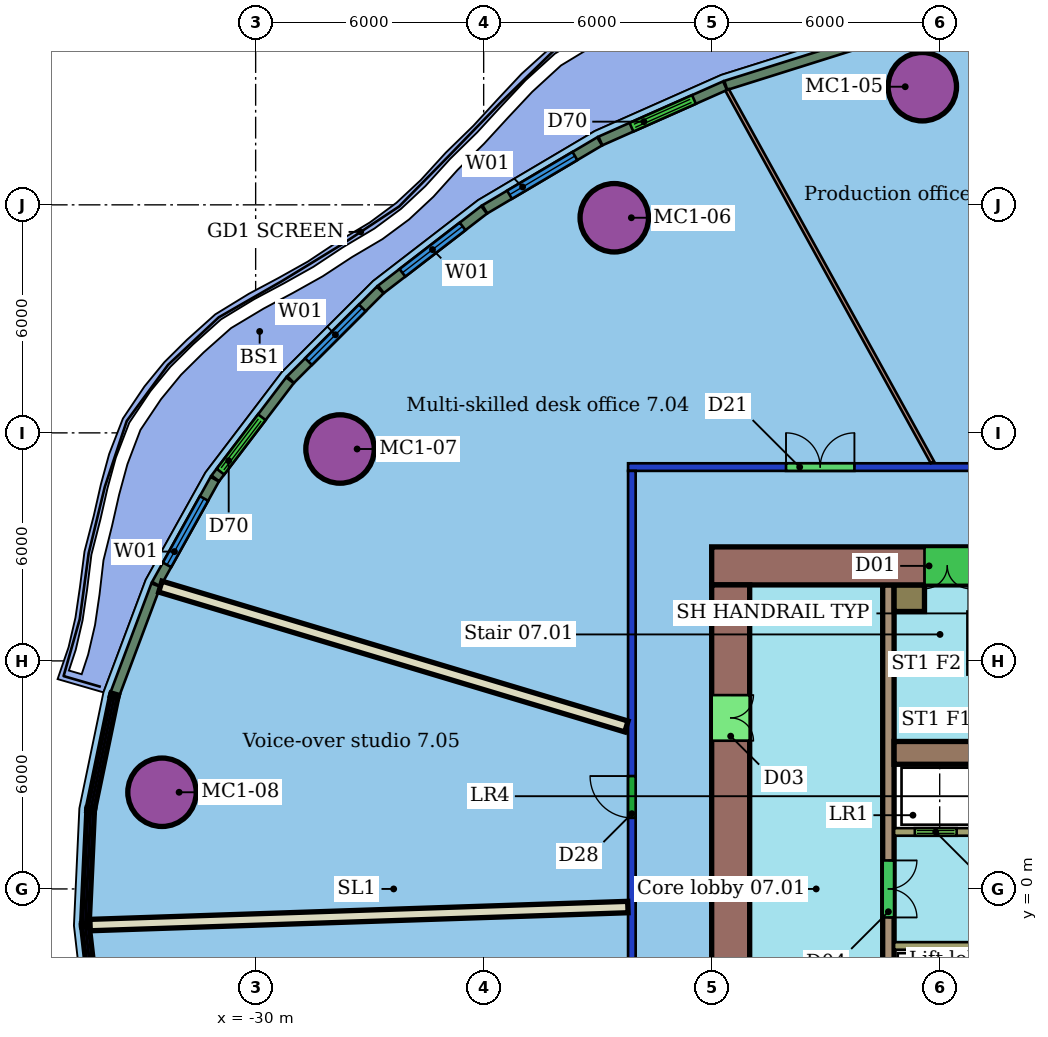
"""IFC4 building model, lengths in metres.
Left out: names, types, materials, properties, quantities, classifications, styles, units other than length and angle.
Written with IfcOpenShell. Run it as: python <this file> out.ifc"""

import sys

from ifc_helpers import new_model, si_unit, direction, frame, frame_2d, origin, origin_2d, place, context, subcontext, project, spatial, rectangle, hollow_circle, extrude, element, fill, save


model = new_model("IFC4")
c1 = context("Model", 3, precision=1e-05, world=origin(), true_north=direction((0.0, 1.0)))
c2 = subcontext(c1, "Body", "Model", "MODEL_VIEW")
j1 = project(units=[si_unit("LENGTHUNIT", "METRE"), si_unit("PLANEANGLEUNIT", "RADIAN")], contexts=[c1])
p1 = place(None, origin())
s1 = spatial("IfcSite", under=j1, at=p1, CompositionType="ELEMENT")
p2 = place(p1, origin())
s2 = spatial("IfcBuilding", under=s1, at=p2, CompositionType="ELEMENT")
p3 = place(p2, frame((0.0, 0.0, 43.4)))
s3 = spatial("IfcBuildingStorey", under=s2, at=p3, CompositionType="ELEMENT", Elevation=43.4)
for number, where, z_axis, x_axis in (
    (1, (-12.458, 21.108, 0.0), (0.0, 0.0, 1.0), (1.0, 0.0, 0.0)),
    (2, (-20.563, 17.66, 0.0), (0.0, 0.0, 1.0), (1.0, 0.0, 0.0)),
    (3, (-27.78, 11.576, 0.0), (0.0, 0.0, 1.0), (1.0, 0.0, 0.0)),
    (4, (-32.464, 2.543, 0.0), (0.0, 0.0, 1.0), (1.0, 0.0, 0.0)),
):
    element("IfcColumn", number, at=place(p3, frame(where, z_axis=z_axis, x_axis=x_axis)), inside=s3, PredefinedType="COLUMN", context=c2, shape_type="SweptSolid", body=[
        extrude(hollow_circle(Radius=0.9, WallThickness=0.06, at=origin_2d()), origin(), (0.0, 0.0, 1.0), 3.55),
    ])
p4 = place(p3, frame((-20.1, -11.0, 0.0), z_axis=(0.0, 0.0, 1.0), x_axis=(0.0, 1.0, 0.0)))
e5 = element("IfcWall", 5, at=p4, inside=s3, PredefinedType="PARTITIONING", context=c2, shape_type="SweptSolid", body=[
    extrude(rectangle(XDim=22.0, YDim=0.2, at=frame_2d((11.0, 0.0))), origin(), (0.0, 0.0, 1.0), 2.85),
])
p5 = place(p4, frame((12.87, 0.0, 0.0)))
e6 = element("IfcOpeningElement", 6, at=p5, cuts=e5, PredefinedType="OPENING", context=c2, shape_type="SweptSolid", body=[
    extrude(rectangle(XDim=1.1, YDim=2.1, at=frame_2d((0.55, 1.05))), frame((0.0, 0.11, 0.0), z_axis=(0.0, -1.0, 0.0), x_axis=(1.0, 0.0, 0.0)), (0.0, 0.0, 1.0), 0.22),
])
p6 = place(p4, frame((5.847, 0.0, 0.0)))
e7 = element("IfcOpeningElement", 7, at=p6, cuts=e5, PredefinedType="OPENING", context=c2, shape_type="SweptSolid", body=[
    extrude(rectangle(XDim=1.8, YDim=2.1, at=frame_2d((0.9, 1.05))), frame((0.0, 0.11, 0.0), z_axis=(0.0, -1.0, 0.0), x_axis=(1.0, 0.0, 0.0)), (0.0, 0.0, 1.0), 0.22),
])
p7 = place(p3, frame((-20.2, 11.1, 0.0), z_axis=(0.0, 0.0, 1.0), x_axis=(1.0, 0.0, 0.0)))
e8 = element("IfcWall", 8, at=p7, inside=s3, PredefinedType="PARTITIONING", context=c2, shape_type="SweptSolid", body=[
    extrude(rectangle(XDim=28.4, YDim=0.2, at=frame_2d((14.2, 0.0))), origin(), (0.0, 0.0, 1.0), 2.85),
])
p8 = place(p7, frame((16.582, 0.0, 0.0)))
e9 = element("IfcOpeningElement", 9, at=p8, cuts=e8, PredefinedType="OPENING", context=c2, shape_type="SweptSolid", body=[
    extrude(rectangle(XDim=1.8, YDim=2.1, at=frame_2d((0.9, 1.05))), frame((0.0, 0.11, 0.0), z_axis=(0.0, -1.0, 0.0), x_axis=(1.0, 0.0, 0.0)), (0.0, 0.0, 1.0), 0.22),
])
p9 = place(p7, frame((9.077, 0.0, 0.0)))
e10 = element("IfcOpeningElement", 10, at=p9, cuts=e8, PredefinedType="OPENING", context=c2, shape_type="SweptSolid", body=[
    extrude(rectangle(XDim=1.0, YDim=2.1, at=frame_2d((0.5, 1.05))), frame((0.0, 0.11, 0.0), z_axis=(0.0, -1.0, 0.0), x_axis=(1.0, 0.0, 0.0)), (0.0, 0.0, 1.0), 0.22),
])
p10 = place(p7, frame((4.156, 0.0, 0.0)))
e11 = element("IfcOpeningElement", 11, at=p10, cuts=e8, PredefinedType="OPENING", context=c2, shape_type="SweptSolid", body=[
    extrude(rectangle(XDim=1.8, YDim=2.1, at=frame_2d((0.9, 1.05))), frame((0.0, 0.11, 0.0), z_axis=(0.0, -1.0, 0.0), x_axis=(1.0, 0.0, 0.0)), (0.0, 0.0, 1.0), 0.22),
])
p11 = place(p3, frame((-17.595, 21.023, 0.0), z_axis=(0.0, 0.0, 1.0), x_axis=(0.482952757362, -0.875646409321, 0.0)))
e12 = element("IfcWall", 12, at=p11, inside=s3, PredefinedType="PARTITIONING", context=c2, shape_type="SweptSolid", body=[
    extrude(rectangle(XDim=11.19, YDim=0.1, at=frame_2d((5.595, 0.0))), origin(), (0.0, 0.0, 1.0), 3.55),
])
p12 = place(p3, frame((-32.508, 7.955, 0.0), z_axis=(0.0, 0.0, 1.0), x_axis=(0.957793744638, -0.287456331872, 0.0)))
e13 = element("IfcWall", 13, at=p12, inside=s3, PredefinedType="PARTITIONING", context=c2, shape_type="SweptSolid", body=[
    extrude(rectangle(XDim=12.805, YDim=0.3, at=frame_2d((6.403, 0.0))), origin(), (0.0, 0.0, 1.0), 3.55),
])
p13 = place(p3, frame((-34.357, -0.951, 0.0), z_axis=(0.0, 0.0, 1.0), x_axis=(0.999438092699, 0.033518634559, 0.0)))
e14 = element("IfcWall", 14, at=p13, inside=s3, PredefinedType="PARTITIONING", context=c2, shape_type="SweptSolid", body=[
    extrude(rectangle(XDim=14.16, YDim=0.3, at=frame_2d((7.08, 0.0))), origin(), (0.0, 0.0, 1.0), 3.55),
])
p14 = place(p3, frame((-14.191, 22.224, 0.0), z_axis=(0.0, 0.0, 1.0), x_axis=(-0.953906738278, -0.300103206694, 0.0)))
e15 = element("IfcWall", 15, at=p14, inside=s3, PredefinedType="SOLIDWALL", context=c2, shape_type="SweptSolid", body=[
    extrude(rectangle(XDim=3.603, YDim=0.25, at=frame_2d((1.802, 0.0))), origin(), (0.0, 0.0, 1.0), 3.15),
])
p15 = place(p3, frame((-17.649, 21.135, 0.0), z_axis=(0.0, 0.0, 1.0), x_axis=(-0.914061167201, -0.405576358552, 0.0)))
e16 = element("IfcWall", 16, at=p15, inside=s3, PredefinedType="SOLIDWALL", context=c2, shape_type="SweptSolid", body=[
    extrude(rectangle(XDim=3.587, YDim=0.25, at=frame_2d((1.793, 0.0))), origin(), (0.0, 0.0, 1.0), 3.15),
])
p16 = place(p15, frame((0.894, 0.0, 0.0)))
e17 = element("IfcOpeningElement", 17, at=p16, cuts=e16, PredefinedType="OPENING", context=c2, shape_type="SweptSolid", body=[
    extrude(rectangle(XDim=1.8, YDim=2.4, at=frame_2d((0.9, 1.2))), frame((0.0, 0.135, 0.0), z_axis=(0.0, -1.0, 0.0), x_axis=(1.0, 0.0, 0.0)), (0.0, 0.0, 1.0), 0.27),
])
p17 = place(p3, frame((-20.948, 19.67, 0.0), z_axis=(0.0, 0.0, 1.0), x_axis=(-0.860556783273, -0.509354515796, 0.0)))
e18 = element("IfcWall", 18, at=p17, inside=s3, PredefinedType="SOLIDWALL", context=c2, shape_type="SweptSolid", body=[
    extrude(rectangle(XDim=3.512, YDim=0.25, at=frame_2d((1.756, 0.0))), origin(), (0.0, 0.0, 1.0), 3.15),
])
p18 = place(p17, frame((0.756, 0.0, 0.8)))
e19 = element("IfcOpeningElement", 19, at=p18, cuts=e18, PredefinedType="OPENING", context=c2, shape_type="SweptSolid", body=[
    extrude(rectangle(XDim=2.0, YDim=2.2, at=frame_2d((1.0, 1.1))), frame((0.0, 0.135, 0.0), z_axis=(0.0, -1.0, 0.0), x_axis=(1.0, 0.0, 0.0)), (0.0, 0.0, 1.0), 0.27),
])
p19 = place(p3, frame((-23.99, 17.868, 0.0), z_axis=(0.0, 0.0, 1.0), x_axis=(-0.792064745515, -0.610437088415, 0.0)))
e20 = element("IfcWall", 20, at=p19, inside=s3, PredefinedType="SOLIDWALL", context=c2, shape_type="SweptSolid", body=[
    extrude(rectangle(XDim=3.426, YDim=0.25, at=frame_2d((1.713, 0.0))), origin(), (0.0, 0.0, 1.0), 3.15),
])
p20 = place(p19, frame((0.713, 0.0, 0.8)))
e21 = element("IfcOpeningElement", 21, at=p20, cuts=e20, PredefinedType="OPENING", context=c2, shape_type="SweptSolid", body=[
    extrude(rectangle(XDim=2.0, YDim=2.2, at=frame_2d((1.0, 1.1))), frame((0.0, 0.135, 0.0), z_axis=(0.0, -1.0, 0.0), x_axis=(1.0, 0.0, 0.0)), (0.0, 0.0, 1.0), 0.27),
])
p21 = place(p3, frame((-26.721, 15.761, 0.0), z_axis=(0.0, 0.0, 1.0), x_axis=(-0.707362946123, -0.706850523415, 0.0)))
e22 = element("IfcWall", 22, at=p21, inside=s3, PredefinedType="SOLIDWALL", context=c2, shape_type="SweptSolid", body=[
    extrude(rectangle(XDim=3.335, YDim=0.25, at=frame_2d((1.667, 0.0))), origin(), (0.0, 0.0, 1.0), 3.15),
])
p22 = place(p21, frame((0.668, 0.0, 0.8)))
e23 = element("IfcOpeningElement", 23, at=p22, cuts=e22, PredefinedType="OPENING", context=c2, shape_type="SweptSolid", body=[
    extrude(rectangle(XDim=2.0, YDim=2.2, at=frame_2d((1.0, 1.1))), frame((0.0, 0.135, 0.0), z_axis=(0.0, -1.0, 0.0), x_axis=(1.0, 0.0, 0.0)), (0.0, 0.0, 1.0), 0.27),
])
p23 = place(p3, frame((-29.097, 13.385, 0.0), z_axis=(0.0, 0.0, 1.0), x_axis=(-0.605655469581, -0.795726996002, 0.0)))
e24 = element("IfcWall", 24, at=p23, inside=s3, PredefinedType="SOLIDWALL", context=c2, shape_type="SweptSolid", body=[
    extrude(rectangle(XDim=3.245, YDim=0.25, at=frame_2d((1.622, 0.0))), origin(), (0.0, 0.0, 1.0), 3.15),
])
p24 = place(p23, frame((1.222, 0.0, 0.0)))
e25 = element("IfcOpeningElement", 25, at=p24, cuts=e24, PredefinedType="OPENING", context=c2, shape_type="SweptSolid", body=[
    extrude(rectangle(XDim=1.8, YDim=2.4, at=frame_2d((0.9, 1.2))), frame((0.0, 0.135, 0.0), z_axis=(0.0, -1.0, 0.0), x_axis=(1.0, 0.0, 0.0)), (0.0, 0.0, 1.0), 0.27),
])
p25 = place(p3, frame((-31.076, 10.781, 0.0), z_axis=(0.0, 0.0, 1.0), x_axis=(-0.486652480259, -0.873595652152, 0.0)))
e26 = element("IfcWall", 26, at=p25, inside=s3, PredefinedType="SOLIDWALL", context=c2, shape_type="SweptSolid", body=[
    extrude(rectangle(XDim=3.161, YDim=0.25, at=frame_2d((1.581, 0.0))), origin(), (0.0, 0.0, 1.0), 3.15),
])
p26 = place(p25, frame((0.581, 0.0, 0.8)))
e27 = element("IfcOpeningElement", 27, at=p26, cuts=e26, PredefinedType="OPENING", context=c2, shape_type="SweptSolid", body=[
    extrude(rectangle(XDim=2.0, YDim=2.2, at=frame_2d((1.0, 1.1))), frame((0.0, 0.135, 0.0), z_axis=(0.0, -1.0, 0.0), x_axis=(1.0, 0.0, 0.0)), (0.0, 0.0, 1.0), 0.27),
])
p27 = place(p3, frame((-32.626, 7.995, 0.0), z_axis=(0.0, 0.0, 1.0), x_axis=(-0.351570793039, -0.936161298859, 0.0)))
e28 = element("IfcWall", 28, at=p27, inside=s3, PredefinedType="SOLIDWALL", context=c2, shape_type="SweptSolid", body=[
    extrude(rectangle(XDim=3.05, YDim=0.25, at=frame_2d((1.525, 0.0))), origin(), (0.0, 0.0, 1.0), 3.15),
])
p28 = place(p3, frame((-6.0, 8.5, 0.0), z_axis=(0.0, 0.0, 1.0), x_axis=(-1.0, 0.0, 0.0)))
e29 = element("IfcWall", 29, at=p28, inside=s3, PredefinedType="SHEAR", context=c2, shape_type="SweptSolid", body=[
    extrude(rectangle(XDim=12.0, YDim=1.0, at=frame_2d((6.0, 0.0))), origin(), (0.0, 0.0, 1.0), 3.4),
])
p29 = place(p28, frame((5.2, 0.0, 0.0)))
e30 = element("IfcOpeningElement", 30, at=p29, cuts=e29, PredefinedType="OPENING", context=c2, shape_type="SweptSolid", body=[
    extrude(rectangle(XDim=1.2, YDim=2.1, at=frame_2d((0.6, 1.05))), frame((0.0, 0.51, 0.0), z_axis=(0.0, -1.0, 0.0), x_axis=(1.0, 0.0, 0.0)), (0.0, 0.0, 1.0), 1.02),
])
p30 = place(p3, frame((-17.5, 8.0, 0.0), z_axis=(0.0, 0.0, 1.0), x_axis=(0.0, -1.0, 0.0)))
e31 = element("IfcWall", 31, at=p30, inside=s3, PredefinedType="SHEAR", context=c2, shape_type="SweptSolid", body=[
    extrude(rectangle(XDim=16.0, YDim=1.0, at=frame_2d((8.0, 0.0))), origin(), (0.0, 0.0, 1.0), 3.4),
])
p31 = place(p30, frame((11.9, 0.0, 0.0)))
e32 = element("IfcOpeningElement", 32, at=p31, cuts=e31, PredefinedType="OPENING", context=c2, shape_type="SweptSolid", body=[
    extrude(rectangle(XDim=1.2, YDim=2.1, at=frame_2d((0.6, 1.05))), frame((0.0, 0.51, 0.0), z_axis=(0.0, -1.0, 0.0), x_axis=(1.0, 0.0, 0.0)), (0.0, 0.0, 1.0), 1.02),
])
p32 = place(p30, frame((2.9, 0.0, 0.0)))
e33 = element("IfcOpeningElement", 33, at=p32, cuts=e31, PredefinedType="OPENING", context=c2, shape_type="SweptSolid", body=[
    extrude(rectangle(XDim=1.2, YDim=2.1, at=frame_2d((0.6, 1.05))), frame((0.0, 0.51, 0.0), z_axis=(0.0, -1.0, 0.0), x_axis=(1.0, 0.0, 0.0)), (0.0, 0.0, 1.0), 1.02),
])
p33 = place(p3, frame((-13.2, 3.58, 0.0), z_axis=(0.0, 0.0, 1.0), x_axis=(1.0, 0.0, 0.0)))
e34 = element("IfcWall", 34, at=p33, inside=s3, PredefinedType="SHEAR", context=c2, shape_type="SweptSolid", body=[
    extrude(rectangle(XDim=7.2, YDim=0.6, at=frame_2d((3.6, 0.0))), origin(), (0.0, 0.0, 1.0), 3.4),
])
p34 = place(p3, frame((-13.35, 8.0, 0.0), z_axis=(0.0, 0.0, 1.0), x_axis=(0.0, -1.0, 0.0)))
e35 = element("IfcWall", 35, at=p34, inside=s3, PredefinedType="SHEAR", context=c2, shape_type="SweptSolid", body=[
    extrude(rectangle(XDim=16.0, YDim=0.3, at=frame_2d((8.0, 0.0))), origin(), (0.0, 0.0, 1.0), 3.4),
])
p35 = place(p34, frame((7.25, 0.0, 0.0)))
e36 = element("IfcOpeningElement", 36, at=p35, cuts=e35, PredefinedType="OPENING", context=c2, shape_type="SweptSolid", body=[
    extrude(rectangle(XDim=1.5, YDim=2.1, at=frame_2d((0.75, 1.05))), frame((0.0, 0.16, 0.0), z_axis=(0.0, -1.0, 0.0), x_axis=(1.0, 0.0, 0.0)), (0.0, 0.0, 1.0), 0.32),
])
p36 = place(p3, frame((-13.2, 1.5, 0.0), z_axis=(0.0, 0.0, 1.0), x_axis=(1.0, 0.0, 0.0)))
e37 = element("IfcWall", 37, at=p36, inside=s3, PredefinedType="SHEAR", context=c2, shape_type="SweptSolid", body=[
    extrude(rectangle(XDim=14.4, YDim=0.2, at=frame_2d((7.2, 0.0))), origin(), (0.0, 0.0, 1.0), 3.4),
])
p37 = place(p36, frame((0.546, 0.0, 0.0)))
e38 = element("IfcOpeningElement", 38, at=p37, cuts=e37, PredefinedType="OPENING", context=c2, shape_type="SweptSolid", body=[
    extrude(rectangle(XDim=1.1, YDim=2.1, at=frame_2d((0.55, 1.05))), frame((0.0, 0.11, 0.0), z_axis=(0.0, -1.0, 0.0), x_axis=(1.0, 0.0, 0.0)), (0.0, 0.0, 1.0), 0.22),
])
p38 = place(p36, frame((2.988, 0.0, 0.0)))
e39 = element("IfcOpeningElement", 39, at=p38, cuts=e37, PredefinedType="OPENING", context=c2, shape_type="SweptSolid", body=[
    extrude(rectangle(XDim=1.1, YDim=2.1, at=frame_2d((0.55, 1.05))), frame((0.0, 0.11, 0.0), z_axis=(0.0, -1.0, 0.0), x_axis=(1.0, 0.0, 0.0)), (0.0, 0.0, 1.0), 0.22),
])
p39 = place(p36, frame((5.429, 0.0, 0.0)))
e40 = element("IfcOpeningElement", 40, at=p39, cuts=e37, PredefinedType="OPENING", context=c2, shape_type="SweptSolid", body=[
    extrude(rectangle(XDim=1.1, YDim=2.1, at=frame_2d((0.55, 1.05))), frame((0.0, 0.11, 0.0), z_axis=(0.0, -1.0, 0.0), x_axis=(1.0, 0.0, 0.0)), (0.0, 0.0, 1.0), 0.22),
])
p40 = place(p36, frame((7.871, 0.0, 0.0)))
e41 = element("IfcOpeningElement", 41, at=p40, cuts=e37, PredefinedType="OPENING", context=c2, shape_type="SweptSolid", body=[
    extrude(rectangle(XDim=1.1, YDim=2.1, at=frame_2d((0.55, 1.05))), frame((0.0, 0.11, 0.0), z_axis=(0.0, -1.0, 0.0), x_axis=(1.0, 0.0, 0.0)), (0.0, 0.0, 1.0), 0.22),
])
p41 = place(p36, frame((11.607, 0.0, 0.0)))
e42 = element("IfcOpeningElement", 42, at=p41, cuts=e37, PredefinedType="OPENING", context=c2, shape_type="SweptSolid", body=[
    extrude(rectangle(XDim=0.9, YDim=2.1, at=frame_2d((0.45, 1.05))), frame((0.0, 0.11, 0.0), z_axis=(0.0, -1.0, 0.0), x_axis=(1.0, 0.0, 0.0)), (0.0, 0.0, 1.0), 0.22),
])
p42 = place(p36, frame((13.25, 0.0, 0.0)))
e43 = element("IfcOpeningElement", 43, at=p42, cuts=e37, PredefinedType="OPENING", context=c2, shape_type="SweptSolid", body=[
    extrude(rectangle(XDim=1.0, YDim=2.1, at=frame_2d((0.5, 1.05))), frame((0.0, 0.11, 0.0), z_axis=(0.0, -1.0, 0.0), x_axis=(1.0, 0.0, 0.0)), (0.0, 0.0, 1.0), 0.22),
])
p43 = place(p3, frame((1.2, -1.5, 0.0), z_axis=(0.0, 0.0, 1.0), x_axis=(-1.0, 0.0, 0.0)))
e44 = element("IfcWall", 44, at=p43, inside=s3, PredefinedType="SHEAR", context=c2, shape_type="SweptSolid", body=[
    extrude(rectangle(XDim=14.4, YDim=0.2, at=frame_2d((7.2, 0.0))), origin(), (0.0, 0.0, 1.0), 3.4),
])
p44 = place(p43, frame((7.821, 0.0, 0.0)))
e45 = element("IfcOpeningElement", 45, at=p44, cuts=e44, PredefinedType="OPENING", context=c2, shape_type="SweptSolid", body=[
    extrude(rectangle(XDim=1.2, YDim=2.1, at=frame_2d((0.6, 1.05))), frame((0.0, 0.11, 0.0), z_axis=(0.0, -1.0, 0.0), x_axis=(1.0, 0.0, 0.0)), (0.0, 0.0, 1.0), 0.22),
])
p45 = place(p43, frame((0.15, 0.0, 0.0)))
e46 = element("IfcOpeningElement", 46, at=p45, cuts=e44, PredefinedType="OPENING", context=c2, shape_type="SweptSolid", body=[
    extrude(rectangle(XDim=0.9, YDim=2.1, at=frame_2d((0.45, 1.05))), frame((0.0, 0.11, 0.0), z_axis=(0.0, -1.0, 0.0), x_axis=(1.0, 0.0, 0.0)), (0.0, 0.0, 1.0), 0.22),
])
p46 = place(p3, frame((-13.2, 7.65, 0.0), z_axis=(0.0, 0.0, 1.0), x_axis=(1.0, 0.0, 0.0)))
e47 = element("IfcWall", 47, at=p46, inside=s3, PredefinedType="SHEAR", context=c2, shape_type="SweptSolid", body=[
    extrude(rectangle(XDim=0.8, YDim=0.7, at=frame_2d((0.4, 0.0))), origin(), (0.0, 0.0, 1.0), 3.4),
])
p47 = place(p10, origin())
e48 = element("IfcDoor", 48, at=p47, inside=s3, OperationType="DOUBLE_DOOR_SINGLE_SWING", PredefinedType="DOOR", context=c2, shape_type="SweptSolid", body=[
    extrude(rectangle(XDim=1.8, YDim=2.1, at=frame_2d((0.9, 1.05))), frame((0.0, 0.025, 0.0), z_axis=(0.0, -1.0, 0.0), x_axis=(1.0, 0.0, 0.0)), (0.0, 0.0, 1.0), 0.05),
])
fill(e11, e48)
p48 = place(p5, origin())
e49 = element("IfcDoor", 49, at=p48, inside=s3, OperationType="SINGLE_SWING_RIGHT", PredefinedType="DOOR", context=c2, shape_type="SweptSolid", body=[
    extrude(rectangle(XDim=1.1, YDim=2.1, at=frame_2d((0.55, 1.05))), frame((0.0, 0.025, 0.0), z_axis=(0.0, -1.0, 0.0), x_axis=(1.0, 0.0, 0.0)), (0.0, 0.0, 1.0), 0.05),
])
fill(e6, e49)
p49 = place(p16, origin())
e50 = element("IfcDoor", 50, at=p49, inside=s3, OperationType="DOUBLE_DOOR_SLIDING", PredefinedType="DOOR", context=c2, shape_type="SweptSolid", body=[
    extrude(rectangle(XDim=1.8, YDim=2.4, at=frame_2d((0.9, 1.2))), frame((0.0, 0.025, 0.0), z_axis=(0.0, -1.0, 0.0), x_axis=(1.0, 0.0, 0.0)), (0.0, 0.0, 1.0), 0.05),
])
fill(e17, e50)
p50 = place(p18, origin())
e51 = element("IfcWindow", 51, at=p50, inside=s3, PartitioningType="SINGLE_PANEL", PredefinedType="WINDOW", context=c2, shape_type="SweptSolid", body=[
    extrude(rectangle(XDim=2.0, YDim=2.2, at=frame_2d((1.0, 1.1))), frame((0.0, 0.03, 0.0), z_axis=(0.0, -1.0, 0.0), x_axis=(1.0, 0.0, 0.0)), (0.0, 0.0, 1.0), 0.06),
])
fill(e19, e51)
p51 = place(p20, origin())
e52 = element("IfcWindow", 52, at=p51, inside=s3, PartitioningType="SINGLE_PANEL", PredefinedType="WINDOW", context=c2, shape_type="SweptSolid", body=[
    extrude(rectangle(XDim=2.0, YDim=2.2, at=frame_2d((1.0, 1.1))), frame((0.0, 0.03, 0.0), z_axis=(0.0, -1.0, 0.0), x_axis=(1.0, 0.0, 0.0)), (0.0, 0.0, 1.0), 0.06),
])
fill(e21, e52)
p52 = place(p22, origin())
e53 = element("IfcWindow", 53, at=p52, inside=s3, PartitioningType="SINGLE_PANEL", PredefinedType="WINDOW", context=c2, shape_type="SweptSolid", body=[
    extrude(rectangle(XDim=2.0, YDim=2.2, at=frame_2d((1.0, 1.1))), frame((0.0, 0.03, 0.0), z_axis=(0.0, -1.0, 0.0), x_axis=(1.0, 0.0, 0.0)), (0.0, 0.0, 1.0), 0.06),
])
fill(e23, e53)
p53 = place(p24, origin())
e54 = element("IfcDoor", 54, at=p53, inside=s3, OperationType="DOUBLE_DOOR_SLIDING", PredefinedType="DOOR", context=c2, shape_type="SweptSolid", body=[
    extrude(rectangle(XDim=1.8, YDim=2.4, at=frame_2d((0.9, 1.2))), frame((0.0, 0.025, 0.0), z_axis=(0.0, -1.0, 0.0), x_axis=(1.0, 0.0, 0.0)), (0.0, 0.0, 1.0), 0.05),
])
fill(e25, e54)
p54 = place(p26, origin())
e55 = element("IfcWindow", 55, at=p54, inside=s3, PartitioningType="SINGLE_PANEL", PredefinedType="WINDOW", context=c2, shape_type="SweptSolid", body=[
    extrude(rectangle(XDim=2.0, YDim=2.2, at=frame_2d((1.0, 1.1))), frame((0.0, 0.03, 0.0), z_axis=(0.0, -1.0, 0.0), x_axis=(1.0, 0.0, 0.0)), (0.0, 0.0, 1.0), 0.06),
])
fill(e27, e55)
p55 = place(p29, origin())
e56 = element("IfcDoor", 56, at=p55, inside=s3, OperationType="DOUBLE_DOOR_SINGLE_SWING", PredefinedType="NOTDEFINED", context=c2, shape_type="SweptSolid", body=[
    extrude(rectangle(XDim=1.2, YDim=2.1, at=frame_2d((0.6, 1.05))), frame((0.0, 0.025, 0.0), z_axis=(0.0, -1.0, 0.0), x_axis=(1.0, 0.0, 0.0)), (0.0, 0.0, 1.0), 0.05),
])
fill(e30, e56)
p56 = place(p32, origin())
e57 = element("IfcDoor", 57, at=p56, inside=s3, OperationType="DOUBLE_DOOR_SINGLE_SWING", PredefinedType="NOTDEFINED", context=c2, shape_type="SweptSolid", body=[
    extrude(rectangle(XDim=1.2, YDim=2.1, at=frame_2d((0.6, 1.05))), frame((0.0, 0.025, 0.0), z_axis=(0.0, -1.0, 0.0), x_axis=(1.0, 0.0, 0.0)), (0.0, 0.0, 1.0), 0.05),
])
fill(e33, e57)
p57 = place(p35, origin())
e58 = element("IfcDoor", 58, at=p57, inside=s3, OperationType="DOUBLE_DOOR_SINGLE_SWING", PredefinedType="NOTDEFINED", context=c2, shape_type="SweptSolid", body=[
    extrude(rectangle(XDim=1.5, YDim=2.1, at=frame_2d((0.75, 1.05))), frame((0.0, 0.025, 0.0), z_axis=(0.0, -1.0, 0.0), x_axis=(1.0, 0.0, 0.0)), (0.0, 0.0, 1.0), 0.05),
])
fill(e36, e58)
p58 = place(p37, origin())
e59 = element("IfcDoor", 59, at=p58, inside=s3, OperationType="DOUBLE_DOOR_SLIDING", PredefinedType="NOTDEFINED", context=c2, shape_type="SweptSolid", body=[
    extrude(rectangle(XDim=1.1, YDim=2.1, at=frame_2d((0.55, 1.05))), frame((0.0, 0.025, 0.0), z_axis=(0.0, -1.0, 0.0), x_axis=(1.0, 0.0, 0.0)), (0.0, 0.0, 1.0), 0.05),
])
fill(e38, e59)
save(model, sys.argv[1])
